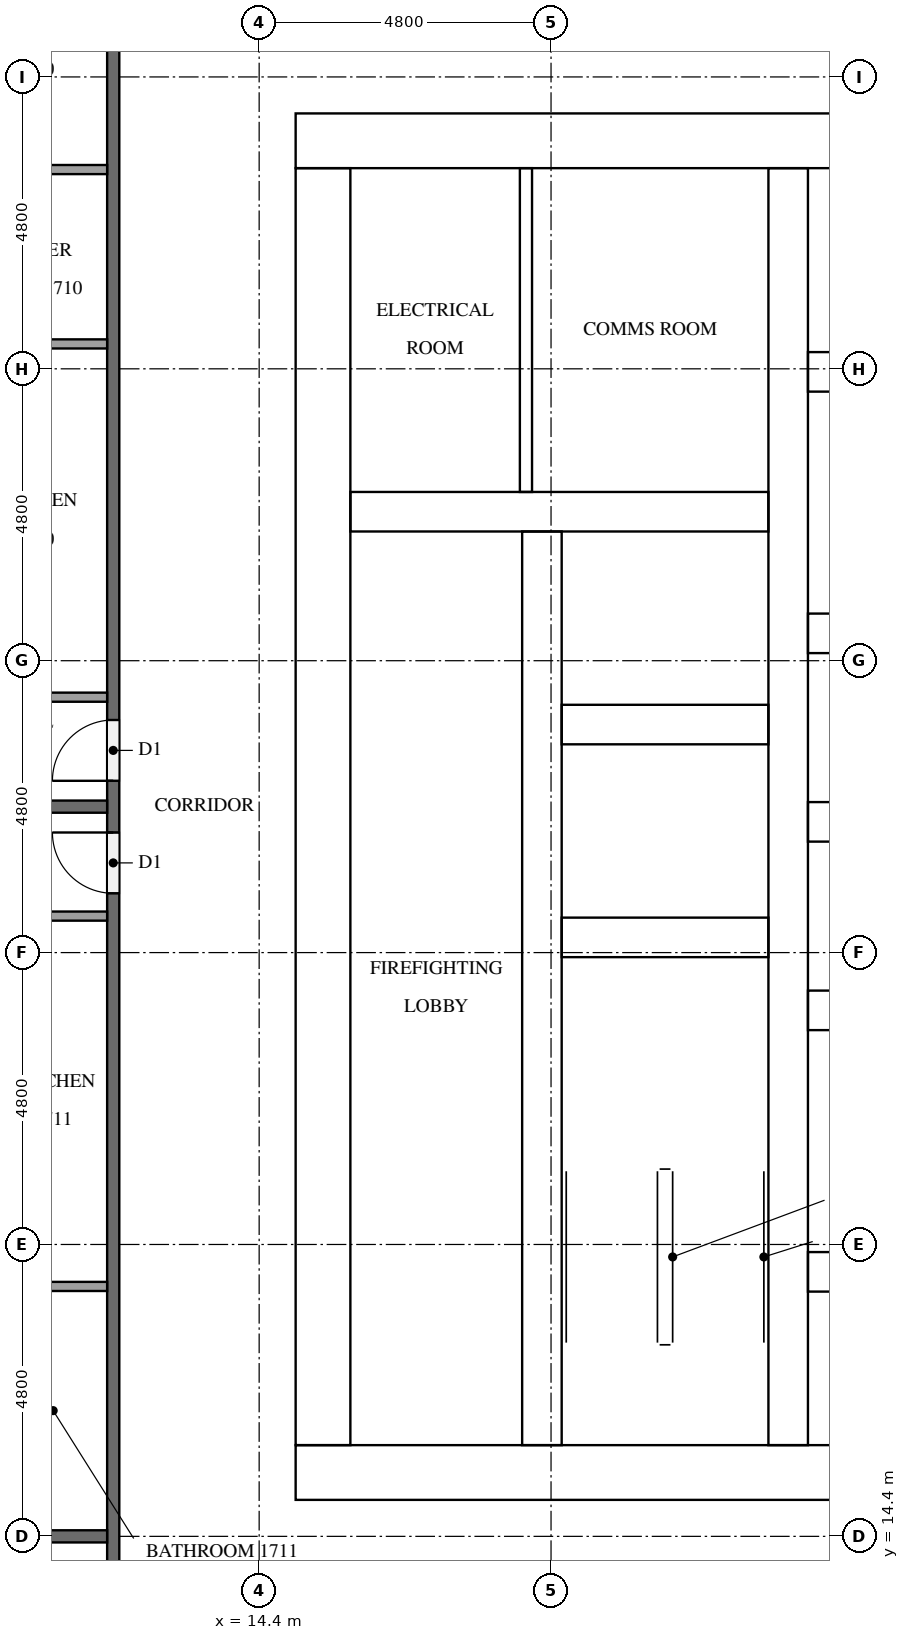
"""IFC4 building model, lengths in metres.
Left out: names, types, materials, properties, quantities, classifications, styles, units other than length and angle.
Written with IfcOpenShell. Run it as: python <this file> out.ifc"""

import sys

from ifc_helpers import new_model, si_unit, direction, frame, frame_2d, origin, place, context, subcontext, project, spatial, rectangle, extrude, element, fill, save


model = new_model("IFC4")
c1 = context("Model", 3, precision=1e-05, world=origin(), true_north=direction((0.0, 1.0)))
c2 = subcontext(c1, "Body", "Model", "MODEL_VIEW")
j1 = project(units=[si_unit("LENGTHUNIT", "METRE"), si_unit("PLANEANGLEUNIT", "RADIAN")], contexts=[c1])
p1 = place(None, origin())
s1 = spatial("IfcSite", under=j1, at=p1, CompositionType="ELEMENT")
p2 = place(p1, origin())
s2 = spatial("IfcBuilding", under=s1, at=p2, CompositionType="ELEMENT")
p3 = place(p2, frame((0.0, 0.0, 69.8)))
s3 = spatial("IfcBuildingStorey", under=s2, at=p3, CompositionType="ELEMENT", Elevation=69.8)
p4 = place(p3, frame((15.0, 15.45, 0.0), z_axis=(0.0, 0.0, 1.0), x_axis=(1.0, 0.0, 0.0)))
e1 = element("IfcWall", 1, at=p4, inside=s3, PredefinedType="SHEAR", context=c2, shape_type="SweptSolid", body=[
    extrude(rectangle(XDim=32.4, YDim=0.9, at=frame_2d((16.2, 0.0))), origin(), (0.0, 0.0, 1.0), 3.2),
])
p5 = place(p4, frame((15.3, 0.0, 0.0)))
e2 = element("IfcOpeningElement", 2, at=p5, cuts=e1, PredefinedType="OPENING", context=c2, shape_type="SweptSolid", body=[
    extrude(rectangle(XDim=1.8, YDim=2.1, at=frame_2d((0.9, 1.05))), frame((0.0, 0.46, 0.0), z_axis=(0.0, -1.0, 0.0), x_axis=(1.0, 0.0, 0.0)), (0.0, 0.0, 1.0), 0.92),
])
p6 = place(p3, frame((15.0, 37.35, 0.0), z_axis=(0.0, 0.0, 1.0), x_axis=(1.0, 0.0, 0.0)))
e3 = element("IfcWall", 3, at=p6, inside=s3, PredefinedType="SHEAR", context=c2, shape_type="SweptSolid", body=[
    extrude(rectangle(XDim=32.4, YDim=0.9, at=frame_2d((16.2, 0.0))), origin(), (0.0, 0.0, 1.0), 3.2),
])
p7 = place(p6, frame((15.3, 0.0, 0.0)))
e4 = element("IfcOpeningElement", 4, at=p7, cuts=e3, PredefinedType="OPENING", context=c2, shape_type="SweptSolid", body=[
    extrude(rectangle(XDim=1.8, YDim=2.1, at=frame_2d((0.9, 1.05))), frame((0.0, 0.46, 0.0), z_axis=(0.0, -1.0, 0.0), x_axis=(1.0, 0.0, 0.0)), (0.0, 0.0, 1.0), 0.92),
])
p8 = place(p6, frame((1.794, 0.0, 0.0)))
e5 = element("IfcOpeningElement", 5, at=p8, cuts=e3, PredefinedType="OPENING", context=c2, shape_type="SweptSolid", body=[
    extrude(rectangle(XDim=1.0, YDim=2.1, at=frame_2d((0.5, 1.05))), frame((0.0, 0.46, 0.0), z_axis=(0.0, -1.0, 0.0), x_axis=(1.0, 0.0, 0.0)), (0.0, 0.0, 1.0), 0.92),
])
p9 = place(p6, frame((5.331, 0.0, 0.0)))
e6 = element("IfcOpeningElement", 6, at=p9, cuts=e3, PredefinedType="OPENING", context=c2, shape_type="SweptSolid", body=[
    extrude(rectangle(XDim=1.0, YDim=2.1, at=frame_2d((0.5, 1.05))), frame((0.0, 0.46, 0.0), z_axis=(0.0, -1.0, 0.0), x_axis=(1.0, 0.0, 0.0)), (0.0, 0.0, 1.0), 0.92),
])
p10 = place(p3, frame((15.45, 15.9, 0.0), z_axis=(0.0, 0.0, 1.0), x_axis=(0.0, 1.0, 0.0)))
e7 = element("IfcWall", 7, at=p10, inside=s3, PredefinedType="SHEAR", context=c2, shape_type="SweptSolid", body=[
    extrude(rectangle(XDim=21.0, YDim=0.9, at=frame_2d((10.5, 0.0))), origin(), (0.0, 0.0, 1.0), 3.2),
])
p11 = place(p10, frame((4.86, 0.0, 0.0)))
e8 = element("IfcOpeningElement", 8, at=p11, cuts=e7, PredefinedType="OPENING", context=c2, shape_type="SweptSolid", body=[
    extrude(rectangle(XDim=1.2, YDim=2.1, at=frame_2d((0.6, 1.05))), frame((0.0, 0.46, 0.0), z_axis=(0.0, -1.0, 0.0), x_axis=(1.0, 0.0, 0.0)), (0.0, 0.0, 1.0), 0.92),
])
p12 = place(p3, frame((19.05, 15.9, 0.0), z_axis=(0.0, 0.0, 1.0), x_axis=(0.0, 1.0, 0.0)))
e9 = element("IfcWall", 9, at=p12, inside=s3, PredefinedType="SHEAR", context=c2, shape_type="SweptSolid", body=[
    extrude(rectangle(XDim=15.025, YDim=0.65, at=frame_2d((7.513, 0.0))), origin(), (0.0, 0.0, 1.0), 3.2),
])
p13 = place(p12, frame((9.55, 0.0, 0.0)))
e10 = element("IfcOpeningElement", 10, at=p13, cuts=e9, PredefinedType="OPENING", context=c2, shape_type="SweptSolid", body=[
    extrude(rectangle(XDim=1.1, YDim=2.1, at=frame_2d((0.55, 1.05))), frame((0.0, 0.335, 0.0), z_axis=(0.0, -1.0, 0.0), x_axis=(1.0, 0.0, 0.0)), (0.0, 0.0, 1.0), 0.67),
])
p14 = place(p12, frame((13.05, 0.0, 0.0)))
e11 = element("IfcOpeningElement", 11, at=p14, cuts=e9, PredefinedType="OPENING", context=c2, shape_type="SweptSolid", body=[
    extrude(rectangle(XDim=1.1, YDim=2.1, at=frame_2d((0.55, 1.05))), frame((0.0, 0.335, 0.0), z_axis=(0.0, -1.0, 0.0), x_axis=(1.0, 0.0, 0.0)), (0.0, 0.0, 1.0), 0.67),
])
p15 = place(p12, frame((0.3, 0.0, 0.0)))
e12 = element("IfcOpeningElement", 12, at=p15, cuts=e9, PredefinedType="OPENING", context=c2, shape_type="SweptSolid", body=[
    extrude(rectangle(XDim=1.2, YDim=2.1, at=frame_2d((0.6, 1.05))), frame((0.0, 0.335, 0.0), z_axis=(0.0, -1.0, 0.0), x_axis=(1.0, 0.0, 0.0)), (0.0, 0.0, 1.0), 0.67),
])
p16 = place(p3, frame((23.1, 15.9, 0.0), z_axis=(0.0, 0.0, 1.0), x_axis=(0.0, 1.0, 0.0)))
e13 = element("IfcWall", 13, at=p16, inside=s3, PredefinedType="SHEAR", context=c2, shape_type="SweptSolid", body=[
    extrude(rectangle(XDim=21.0, YDim=0.65, at=frame_2d((10.5, 0.0))), origin(), (0.0, 0.0, 1.0), 3.2),
])
for number, where, z_axis, x_axis in (
    (14, (19.375, 24.25, 0.0), (0.0, 0.0, 1.0), (1.0, 0.0, 0.0)),
    (15, (19.375, 27.75, 0.0), (0.0, 0.0, 1.0), (1.0, 0.0, 0.0)),
):
    element("IfcWall", number, at=place(p3, frame(where, z_axis=z_axis, x_axis=x_axis)), inside=s3, PredefinedType="SHEAR", context=c2, shape_type="SweptSolid", body=[
        extrude(rectangle(XDim=3.4, YDim=0.65, at=frame_2d((1.7, 0.0))), origin(), (0.0, 0.0, 1.0), 3.2),
    ])
p17 = place(p3, frame((15.9, 31.25, 0.0), z_axis=(0.0, 0.0, 1.0), x_axis=(1.0, 0.0, 0.0)))
e16 = element("IfcWall", 16, at=p17, inside=s3, PredefinedType="SHEAR", context=c2, shape_type="SweptSolid", body=[
    extrude(rectangle(XDim=6.875, YDim=0.65, at=frame_2d((3.438, 0.0))), origin(), (0.0, 0.0, 1.0), 3.2),
])
p18 = place(p3, frame((23.425, 18.75, 0.0), z_axis=(0.0, 0.0, 1.0), x_axis=(1.0, 0.0, 0.0)))
e17 = element("IfcWall", 17, at=p18, inside=s3, PredefinedType="SHEAR", context=c2, shape_type="SweptSolid", body=[
    extrude(rectangle(XDim=5.6, YDim=0.65, at=frame_2d((2.8, 0.0))), origin(), (0.0, 0.0, 1.0), 3.2),
])
p19 = place(p18, frame((0.637, 0.0, 0.0)))
e18 = element("IfcOpeningElement", 18, at=p19, cuts=e17, PredefinedType="OPENING", context=c2, shape_type="SweptSolid", body=[
    extrude(rectangle(XDim=1.1, YDim=2.1, at=frame_2d((0.55, 1.05))), frame((0.0, 0.335, 0.0), z_axis=(0.0, -1.0, 0.0), x_axis=(1.0, 0.0, 0.0)), (0.0, 0.0, 1.0), 0.67),
])
p20 = place(p18, frame((3.212, 0.0, 0.0)))
e19 = element("IfcOpeningElement", 19, at=p20, cuts=e17, PredefinedType="OPENING", context=c2, shape_type="SweptSolid", body=[
    extrude(rectangle(XDim=1.1, YDim=2.1, at=frame_2d((0.55, 1.05))), frame((0.0, 0.335, 0.0), z_axis=(0.0, -1.0, 0.0), x_axis=(1.0, 0.0, 0.0)), (0.0, 0.0, 1.0), 0.67),
])
p21 = place(p3, frame((23.425, 23.05, 0.0), z_axis=(0.0, 0.0, 1.0), x_axis=(1.0, 0.0, 0.0)))
e20 = element("IfcWall", 20, at=p21, inside=s3, PredefinedType="SHEAR", context=c2, shape_type="SweptSolid", body=[
    extrude(rectangle(XDim=15.55, YDim=0.65, at=frame_2d((7.775, 0.0))), origin(), (0.0, 0.0, 1.0), 3.2),
])
p22 = place(p21, frame((0.663, 0.0, 0.0)))
e21 = element("IfcOpeningElement", 21, at=p22, cuts=e20, PredefinedType="OPENING", context=c2, shape_type="SweptSolid", body=[
    extrude(rectangle(XDim=1.1, YDim=2.1, at=frame_2d((0.55, 1.05))), frame((0.0, 0.335, 0.0), z_axis=(0.0, -1.0, 0.0), x_axis=(1.0, 0.0, 0.0)), (0.0, 0.0, 1.0), 0.67),
])
p23 = place(p21, frame((3.288, 0.0, 0.0)))
e22 = element("IfcOpeningElement", 22, at=p23, cuts=e20, PredefinedType="OPENING", context=c2, shape_type="SweptSolid", body=[
    extrude(rectangle(XDim=1.1, YDim=2.1, at=frame_2d((0.55, 1.05))), frame((0.0, 0.335, 0.0), z_axis=(0.0, -1.0, 0.0), x_axis=(1.0, 0.0, 0.0)), (0.0, 0.0, 1.0), 0.67),
])
p24 = place(p21, frame((11.667, 0.0, 0.0)))
e23 = element("IfcOpeningElement", 23, at=p24, cuts=e20, PredefinedType="OPENING", context=c2, shape_type="SweptSolid", body=[
    extrude(rectangle(XDim=1.0, YDim=2.1, at=frame_2d((0.5, 1.05))), frame((0.0, 0.335, 0.0), z_axis=(0.0, -1.0, 0.0), x_axis=(1.0, 0.0, 0.0)), (0.0, 0.0, 1.0), 0.67),
])
p25 = place(p21, frame((14.292, 0.0, 0.0)))
e24 = element("IfcOpeningElement", 24, at=p25, cuts=e20, PredefinedType="OPENING", context=c2, shape_type="SweptSolid", body=[
    extrude(rectangle(XDim=1.0, YDim=2.1, at=frame_2d((0.5, 1.05))), frame((0.0, 0.335, 0.0), z_axis=(0.0, -1.0, 0.0), x_axis=(1.0, 0.0, 0.0)), (0.0, 0.0, 1.0), 0.67),
])
p26 = place(p3, frame((23.425, 26.15, 0.0), z_axis=(0.0, 0.0, 1.0), x_axis=(1.0, 0.0, 0.0)))
e25 = element("IfcWall", 25, at=p26, inside=s3, PredefinedType="SHEAR", context=c2, shape_type="SweptSolid", body=[
    extrude(rectangle(XDim=15.55, YDim=0.65, at=frame_2d((7.775, 0.0))), origin(), (0.0, 0.0, 1.0), 3.2),
])
p27 = place(p3, frame((23.425, 29.25, 0.0), z_axis=(0.0, 0.0, 1.0), x_axis=(1.0, 0.0, 0.0)))
e26 = element("IfcWall", 26, at=p27, inside=s3, PredefinedType="SHEAR", context=c2, shape_type="SweptSolid", body=[
    extrude(rectangle(XDim=15.55, YDim=0.65, at=frame_2d((7.775, 0.0))), origin(), (0.0, 0.0, 1.0), 3.2),
])
p28 = place(p27, frame((1.394, 0.0, 0.0)))
e27 = element("IfcOpeningElement", 27, at=p28, cuts=e26, PredefinedType="OPENING", context=c2, shape_type="SweptSolid", body=[
    extrude(rectangle(XDim=1.0, YDim=2.1, at=frame_2d((0.5, 1.05))), frame((0.0, 0.335, 0.0), z_axis=(0.0, -1.0, 0.0), x_axis=(1.0, 0.0, 0.0)), (0.0, 0.0, 1.0), 0.67),
])
p29 = place(p27, frame((5.331, 0.0, 0.0)))
e28 = element("IfcOpeningElement", 28, at=p29, cuts=e26, PredefinedType="OPENING", context=c2, shape_type="SweptSolid", body=[
    extrude(rectangle(XDim=1.0, YDim=2.1, at=frame_2d((0.5, 1.05))), frame((0.0, 0.335, 0.0), z_axis=(0.0, -1.0, 0.0), x_axis=(1.0, 0.0, 0.0)), (0.0, 0.0, 1.0), 0.67),
])
p30 = place(p27, frame((9.219, 0.0, 0.0)))
e29 = element("IfcOpeningElement", 29, at=p30, cuts=e26, PredefinedType="OPENING", context=c2, shape_type="SweptSolid", body=[
    extrude(rectangle(XDim=1.0, YDim=2.1, at=frame_2d((0.5, 1.05))), frame((0.0, 0.335, 0.0), z_axis=(0.0, -1.0, 0.0), x_axis=(1.0, 0.0, 0.0)), (0.0, 0.0, 1.0), 0.67),
])
p31 = place(p27, frame((13.156, 0.0, 0.0)))
e30 = element("IfcOpeningElement", 30, at=p31, cuts=e26, PredefinedType="OPENING", context=c2, shape_type="SweptSolid", body=[
    extrude(rectangle(XDim=1.0, YDim=2.1, at=frame_2d((0.5, 1.05))), frame((0.0, 0.335, 0.0), z_axis=(0.0, -1.0, 0.0), x_axis=(1.0, 0.0, 0.0)), (0.0, 0.0, 1.0), 0.67),
])
p32 = place(p3, frame((23.425, 33.55, 0.0), z_axis=(0.0, 0.0, 1.0), x_axis=(1.0, 0.0, 0.0)))
e31 = element("IfcWall", 31, at=p32, inside=s3, PredefinedType="SHEAR", context=c2, shape_type="SweptSolid", body=[
    extrude(rectangle(XDim=5.6, YDim=0.65, at=frame_2d((2.8, 0.0))), origin(), (0.0, 0.0, 1.0), 3.2),
])
p33 = place(p3, frame((18.788, 31.575, 0.0), z_axis=(0.0, 0.0, 1.0), x_axis=(0.0, 1.0, 0.0)))
e32 = element("IfcWall", 32, at=p33, inside=s3, PredefinedType="PARTITIONING", context=c2, shape_type="SweptSolid", body=[
    extrude(rectangle(XDim=5.325, YDim=0.2, at=frame_2d((2.663, 0.0))), origin(), (0.0, 0.0, 1.0), 3.2),
])
p34 = place(p3, frame((12.0, 12.1, 0.0), z_axis=(0.0, 0.0, 1.0), x_axis=(0.0, 1.0, 0.0)))
e33 = element("IfcWall", 33, at=p34, inside=s3, PredefinedType="PARTITIONING", context=c2, shape_type="SweptSolid", body=[
    extrude(rectangle(XDim=28.6, YDim=0.2, at=frame_2d((14.3, 0.0))), origin(), (0.0, 0.0, 1.0), 3.2),
])
p35 = place(p34, frame((14.725, 0.0, 0.0)))
e34 = element("IfcOpeningElement", 34, at=p35, cuts=e33, PredefinedType="OPENING", context=c2, shape_type="SweptSolid", body=[
    extrude(rectangle(XDim=1.0, YDim=2.1, at=frame_2d((0.5, 1.05))), frame((0.0, 0.11, 0.0), z_axis=(0.0, -1.0, 0.0), x_axis=(1.0, 0.0, 0.0)), (0.0, 0.0, 1.0), 0.22),
])
p36 = place(p34, frame((12.875, 0.0, 0.0)))
e35 = element("IfcOpeningElement", 35, at=p36, cuts=e33, PredefinedType="OPENING", context=c2, shape_type="SweptSolid", body=[
    extrude(rectangle(XDim=1.0, YDim=2.1, at=frame_2d((0.5, 1.05))), frame((0.0, 0.11, 0.0), z_axis=(0.0, -1.0, 0.0), x_axis=(1.0, 0.0, 0.0)), (0.0, 0.0, 1.0), 0.22),
])
p37 = place(p34, frame((0.875, 0.0, 0.0)))
e36 = element("IfcOpeningElement", 36, at=p37, cuts=e33, PredefinedType="OPENING", context=c2, shape_type="SweptSolid", body=[
    extrude(rectangle(XDim=1.0, YDim=2.1, at=frame_2d((0.5, 1.05))), frame((0.0, 0.11, 0.0), z_axis=(0.0, -1.0, 0.0), x_axis=(1.0, 0.0, 0.0)), (0.0, 0.0, 1.0), 0.22),
])
p38 = place(p3, frame((4.9, 26.4, 0.0), z_axis=(0.0, 0.0, 1.0), x_axis=(1.0, 0.0, 0.0)))
e37 = element("IfcWall", 37, at=p38, inside=s3, PredefinedType="PARTITIONING", context=c2, shape_type="SweptSolid", body=[
    extrude(rectangle(XDim=7.0, YDim=0.2, at=frame_2d((3.5, 0.0))), origin(), (0.0, 0.0, 1.0), 3.2),
])
p39 = place(p3, frame((5.225, 14.4, 0.0), z_axis=(0.0, 0.0, 1.0), x_axis=(1.0, 0.0, 0.0)))
e38 = element("IfcWall", 38, at=p39, inside=s3, PredefinedType="PARTITIONING", context=c2, shape_type="SweptSolid", body=[
    extrude(rectangle(XDim=6.675, YDim=0.2, at=frame_2d((3.337, 0.0))), origin(), (0.0, 0.0, 1.0), 3.2),
])
for number, where, z_axis, x_axis in (
    (39, (11.9, 34.01, 0.0), (0.0, 0.0, 1.0), (-1.0, 0.0, 0.0)),
    (40, (11.9, 36.877, 0.0), (0.0, 0.0, 1.0), (-1.0, 0.0, 0.0)),
):
    element("IfcWall", number, at=place(p3, frame(where, z_axis=z_axis, x_axis=x_axis)), inside=s3, PredefinedType="PARTITIONING", context=c2, shape_type="SweptSolid", body=[
        extrude(rectangle(XDim=2.375, YDim=0.15, at=frame_2d((1.188, 0.0))), origin(), (0.0, 0.0, 1.0), 3.2),
    ])
p40 = place(p3, frame((11.9, 28.2, 0.0), z_axis=(0.0, 0.0, 1.0), x_axis=(-1.0, 0.0, 0.0)))
e41 = element("IfcWall", 41, at=p40, inside=s3, PredefinedType="PARTITIONING", context=c2, shape_type="SweptSolid", body=[
    extrude(rectangle(XDim=2.525, YDim=0.15, at=frame_2d((1.262, 0.0))), origin(), (0.0, 0.0, 1.0), 3.2),
])
p41 = place(p3, frame((11.9, 18.51, 0.0), z_axis=(0.0, 0.0, 1.0), x_axis=(-1.0, 0.0, 0.0)))
e42 = element("IfcWall", 42, at=p41, inside=s3, PredefinedType="PARTITIONING", context=c2, shape_type="SweptSolid", body=[
    extrude(rectangle(XDim=1.775, YDim=0.15, at=frame_2d((0.887, 0.0))), origin(), (0.0, 0.0, 1.0), 3.2),
])
p42 = place(p3, frame((11.9, 24.6, 0.0), z_axis=(0.0, 0.0, 1.0), x_axis=(-1.0, 0.0, 0.0)))
e43 = element("IfcWall", 43, at=p42, inside=s3, PredefinedType="PARTITIONING", context=c2, shape_type="SweptSolid", body=[
    extrude(rectangle(XDim=1.925, YDim=0.15, at=frame_2d((0.962, 0.0))), origin(), (0.0, 0.0, 1.0), 3.2),
])
p43 = place(p13, origin())
e44 = element("IfcDoor", 44, at=p43, inside=s3, OperationType="DOUBLE_DOOR_SLIDING", PredefinedType="DOOR", context=c2, shape_type="SweptSolid", body=[
    extrude(rectangle(XDim=1.1, YDim=2.1, at=frame_2d((0.55, 1.05))), frame((0.0, 0.025, 0.0), z_axis=(0.0, -1.0, 0.0), x_axis=(1.0, 0.0, 0.0)), (0.0, 0.0, 1.0), 0.05),
])
fill(e10, e44)
p44 = place(p14, origin())
e45 = element("IfcDoor", 45, at=p44, inside=s3, OperationType="DOUBLE_DOOR_SLIDING", PredefinedType="DOOR", context=c2, shape_type="SweptSolid", body=[
    extrude(rectangle(XDim=1.1, YDim=2.1, at=frame_2d((0.55, 1.05))), frame((0.0, 0.025, 0.0), z_axis=(0.0, -1.0, 0.0), x_axis=(1.0, 0.0, 0.0)), (0.0, 0.0, 1.0), 0.05),
])
fill(e11, e45)
p45 = place(p15, frame((1.2, 0.0, 0.0), z_axis=(0.0, 0.0, 1.0), x_axis=(-1.0, 0.0, 0.0)))
e46 = element("IfcDoor", 46, at=p45, inside=s3, OperationType="SINGLE_SWING_LEFT", PredefinedType="DOOR", context=c2, shape_type="SweptSolid", body=[
    extrude(rectangle(XDim=1.2, YDim=2.1, at=frame_2d((0.6, 1.05))), frame((0.0, 0.025, 0.0), z_axis=(0.0, -1.0, 0.0), x_axis=(1.0, 0.0, 0.0)), (0.0, 0.0, 1.0), 0.05),
])
fill(e12, e46)
p46 = place(p11, frame((1.2, 0.0, 0.0), z_axis=(0.0, 0.0, 1.0), x_axis=(-1.0, 0.0, 0.0)))
e47 = element("IfcDoor", 47, at=p46, inside=s3, OperationType="SINGLE_SWING_RIGHT", PredefinedType="DOOR", context=c2, shape_type="SweptSolid", body=[
    extrude(rectangle(XDim=1.2, YDim=2.1, at=frame_2d((0.6, 1.05))), frame((0.0, 0.025, 0.0), z_axis=(0.0, -1.0, 0.0), x_axis=(1.0, 0.0, 0.0)), (0.0, 0.0, 1.0), 0.05),
])
fill(e8, e47)
p47 = place(p8, origin())
e48 = element("IfcDoor", 48, at=p47, inside=s3, OperationType="SINGLE_SWING_RIGHT", PredefinedType="DOOR", context=c2, shape_type="SweptSolid", body=[
    extrude(rectangle(XDim=1.0, YDim=2.1, at=frame_2d((0.5, 1.05))), frame((0.0, 0.025, 0.0), z_axis=(0.0, -1.0, 0.0), x_axis=(1.0, 0.0, 0.0)), (0.0, 0.0, 1.0), 0.05),
])
fill(e5, e48)
p48 = place(p9, origin())
e49 = element("IfcDoor", 49, at=p48, inside=s3, OperationType="SINGLE_SWING_LEFT", PredefinedType="DOOR", context=c2, shape_type="SweptSolid", body=[
    extrude(rectangle(XDim=1.0, YDim=2.1, at=frame_2d((0.5, 1.05))), frame((0.0, 0.025, 0.0), z_axis=(0.0, -1.0, 0.0), x_axis=(1.0, 0.0, 0.0)), (0.0, 0.0, 1.0), 0.05),
])
fill(e6, e49)
p49 = place(p35, origin())
e50 = element("IfcDoor", 50, at=p49, inside=s3, OperationType="SINGLE_SWING_LEFT", PredefinedType="DOOR", context=c2, shape_type="SweptSolid", body=[
    extrude(rectangle(XDim=1.0, YDim=2.1, at=frame_2d((0.5, 1.05))), frame((0.0, 0.025, 0.0), z_axis=(0.0, -1.0, 0.0), x_axis=(1.0, 0.0, 0.0)), (0.0, 0.0, 1.0), 0.05),
])
fill(e34, e50)
p50 = place(p36, origin())
e51 = element("IfcDoor", 51, at=p50, inside=s3, OperationType="SINGLE_SWING_RIGHT", PredefinedType="DOOR", context=c2, shape_type="SweptSolid", body=[
    extrude(rectangle(XDim=1.0, YDim=2.1, at=frame_2d((0.5, 1.05))), frame((0.0, 0.025, 0.0), z_axis=(0.0, -1.0, 0.0), x_axis=(1.0, 0.0, 0.0)), (0.0, 0.0, 1.0), 0.05),
])
fill(e35, e51)
save(model, sys.argv[1])
